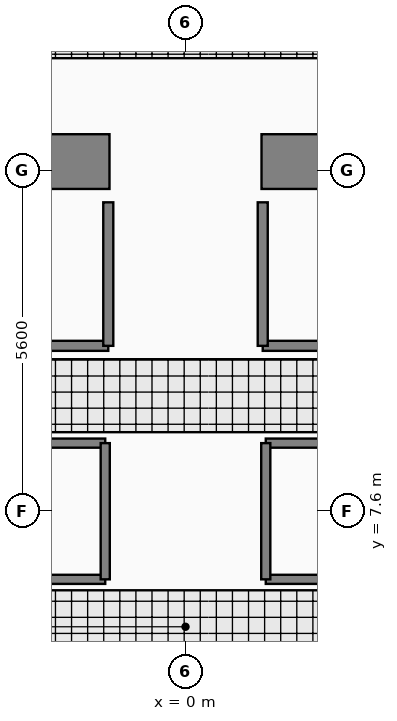
"""IFC4 building model, lengths in metres.
Left out: names, types, materials, properties, quantities, classifications, styles, units other than length and angle.
Written with IfcOpenShell. Run it as: python <this file> out.ifc"""

import sys

from ifc_helpers import new_model, si_unit, direction, frame, frame_2d, origin, place, context, subcontext, project, spatial, rectangle, extrude, element, fill, save


model = new_model("IFC4")
c1 = context("Model", 3, precision=1e-05, world=origin(), true_north=direction((0.0, 1.0)))
c2 = subcontext(c1, "Body", "Model", "MODEL_VIEW")
j1 = project(units=[si_unit("LENGTHUNIT", "METRE"), si_unit("PLANEANGLEUNIT", "RADIAN")], contexts=[c1])
p1 = place(None, origin())
s1 = spatial("IfcSite", under=j1, at=p1, CompositionType="ELEMENT")
p2 = place(p1, origin())
s2 = spatial("IfcBuilding", under=s1, at=p2, CompositionType="ELEMENT")
p3 = place(p2, origin())
s3 = spatial("IfcBuildingStorey", under=s2, at=p3, CompositionType="ELEMENT", Elevation=0.0)
for number, where, z_axis, x_axis in (
    (1, (-8.85, 13.35, 0.0), (0.0, 0.0, 1.0), (1.0, 0.0, 0.0)),
    (2, (1.25, 13.35, 0.0), (0.0, 0.0, 1.0), (1.0, 0.0, 0.0)),
):
    element("IfcWall", number, at=place(p3, frame(where, z_axis=z_axis, x_axis=x_axis)), inside=s3, PredefinedType="SHEAR", context=c2, shape_type="SweptSolid", body=[
        extrude(rectangle(XDim=7.6, YDim=0.9, at=frame_2d((3.8, 0.0))), origin(), (0.0, 0.0, 1.0), 5.75),
    ])
p4 = place(p3, frame((-3.75, 10.32, 0.0), z_axis=(0.0, 0.0, 1.0), x_axis=(1.0, 0.0, 0.0)))
e3 = element("IfcWall", 3, at=p4, inside=s3, PredefinedType="PARTITIONING", context=c2, shape_type="SweptSolid", body=[
    extrude(rectangle(XDim=2.48, YDim=0.165, at=frame_2d((1.24, 0.0))), origin(), (0.0, 0.0, 1.0), 5.75),
])
p5 = place(p4, frame((0.69, 0.0, 0.0)))
e4 = element("IfcOpeningElement", 4, at=p5, cuts=e3, PredefinedType="OPENING", context=c2, shape_type="SweptSolid", body=[
    extrude(rectangle(XDim=1.1, YDim=2.25, at=frame_2d((0.55, 1.125))), frame((0.0, 0.093, 0.0), z_axis=(0.0, -1.0, 0.0), x_axis=(1.0, 0.0, 0.0)), (0.0, 0.0, 1.0), 0.185),
])
p6 = place(p3, frame((1.27, 10.32, 0.0), z_axis=(0.0, 0.0, 1.0), x_axis=(1.0, 0.0, 0.0)))
e5 = element("IfcWall", 5, at=p6, inside=s3, PredefinedType="PARTITIONING", context=c2, shape_type="SweptSolid", body=[
    extrude(rectangle(XDim=2.48, YDim=0.165, at=frame_2d((1.24, 0.0))), origin(), (0.0, 0.0, 1.0), 5.75),
])
p7 = place(p6, frame((0.69, 0.0, 0.0)))
e6 = element("IfcOpeningElement", 6, at=p7, cuts=e5, PredefinedType="OPENING", context=c2, shape_type="SweptSolid", body=[
    extrude(rectangle(XDim=1.1, YDim=2.25, at=frame_2d((0.55, 1.125))), frame((0.0, 0.093, 0.0), z_axis=(0.0, -1.0, 0.0), x_axis=(1.0, 0.0, 0.0)), (0.0, 0.0, 1.0), 0.185),
])
p8 = place(p3, frame((-6.16, 6.48, 0.0), z_axis=(0.0, 0.0, 1.0), x_axis=(1.0, 0.0, 0.0)))
e7 = element("IfcWall", 7, at=p8, inside=s3, PredefinedType="PARTITIONING", context=c2, shape_type="SweptSolid", body=[
    extrude(rectangle(XDim=4.84, YDim=0.15, at=frame_2d((2.42, 0.0))), origin(), (0.0, 0.0, 1.0), 5.75),
])
p9 = place(p8, frame((1.97, 0.0, 0.0)))
e8 = element("IfcOpeningElement", 8, at=p9, cuts=e7, PredefinedType="OPENING", context=c2, shape_type="SweptSolid", body=[
    extrude(rectangle(XDim=0.9, YDim=2.15, at=frame_2d((0.45, 1.075))), frame((0.0, 0.085, 0.0), z_axis=(0.0, -1.0, 0.0), x_axis=(1.0, 0.0, 0.0)), (0.0, 0.0, 1.0), 0.17),
])
p10 = place(p3, frame((1.32, 8.72, 0.0), z_axis=(0.0, 0.0, 1.0), x_axis=(1.0, 0.0, 0.0)))
e9 = element("IfcWall", 9, at=p10, inside=s3, PredefinedType="PARTITIONING", context=c2, shape_type="SweptSolid", body=[
    extrude(rectangle(XDim=2.32, YDim=0.15, at=frame_2d((1.16, 0.0))), origin(), (0.0, 0.0, 1.0), 5.75),
])
p11 = place(p10, frame((0.71, 0.0, 0.0)))
e10 = element("IfcOpeningElement", 10, at=p11, cuts=e9, PredefinedType="OPENING", context=c2, shape_type="SweptSolid", body=[
    extrude(rectangle(XDim=0.9, YDim=2.15, at=frame_2d((0.45, 1.075))), frame((0.0, 0.085, 0.0), z_axis=(0.0, -1.0, 0.0), x_axis=(1.0, 0.0, 0.0)), (0.0, 0.0, 1.0), 0.17),
])
for number, where, z_axis, x_axis in (
    (11, (-1.27, 10.32, 0.0), (0.0, 0.0, 1.0), (0.0, 1.0, 0.0)),
    (12, (1.27, 10.32, 0.0), (0.0, 0.0, 1.0), (0.0, 1.0, 0.0)),
):
    element("IfcWall", number, at=place(p3, frame(where, z_axis=z_axis, x_axis=x_axis)), inside=s3, PredefinedType="PARTITIONING", context=c2, shape_type="SweptSolid", body=[
        extrude(rectangle(XDim=2.36, YDim=0.165, at=frame_2d((1.18, 0.0))), origin(), (0.0, 0.0, 1.0), 5.75),
    ])
p12 = place(p3, frame((-6.16, 8.72, 0.0), z_axis=(0.0, 0.0, 1.0), x_axis=(1.0, 0.0, 0.0)))
e13 = element("IfcWall", 13, at=p12, inside=s3, PredefinedType="PARTITIONING", context=c2, shape_type="SweptSolid", body=[
    extrude(rectangle(XDim=4.84, YDim=0.15, at=frame_2d((2.42, 0.0))), origin(), (0.0, 0.0, 1.0), 5.75),
])
p13 = place(p3, frame((-1.32, 6.48, 0.0), z_axis=(0.0, 0.0, 1.0), x_axis=(0.0, 1.0, 0.0)))
e14 = element("IfcWall", 14, at=p13, inside=s3, PredefinedType="PARTITIONING", context=c2, shape_type="SweptSolid", body=[
    extrude(rectangle(XDim=2.24, YDim=0.15, at=frame_2d((1.12, 0.0))), origin(), (0.0, 0.0, 1.0), 5.75),
])
p14 = place(p3, frame((1.32, 6.48, 0.0), z_axis=(0.0, 0.0, 1.0), x_axis=(1.0, 0.0, 0.0)))
e15 = element("IfcWall", 15, at=p14, inside=s3, PredefinedType="PARTITIONING", context=c2, shape_type="SweptSolid", body=[
    extrude(rectangle(XDim=2.32, YDim=0.15, at=frame_2d((1.16, 0.0))), origin(), (0.0, 0.0, 1.0), 5.75),
])
p15 = place(p3, frame((1.32, 6.48, 0.0), z_axis=(0.0, 0.0, 1.0), x_axis=(0.0, 1.0, 0.0)))
e16 = element("IfcWall", 16, at=p15, inside=s3, PredefinedType="PARTITIONING", context=c2, shape_type="SweptSolid", body=[
    extrude(rectangle(XDim=2.24, YDim=0.15, at=frame_2d((1.12, 0.0))), origin(), (0.0, 0.0, 1.0), 5.75),
])
p16 = place(p5, origin())
e17 = element("IfcDoor", 17, at=p16, inside=s3, OperationType="SLIDING_TO_LEFT", PredefinedType="DOOR", context=c2, shape_type="SweptSolid", body=[
    extrude(rectangle(XDim=1.1, YDim=2.25, at=frame_2d((0.55, 1.125))), frame((0.0, 0.025, 0.0), z_axis=(0.0, -1.0, 0.0), x_axis=(1.0, 0.0, 0.0)), (0.0, 0.0, 1.0), 0.05),
])
fill(e4, e17)
p17 = place(p7, origin())
e18 = element("IfcDoor", 18, at=p17, inside=s3, OperationType="SLIDING_TO_LEFT", PredefinedType="DOOR", context=c2, shape_type="SweptSolid", body=[
    extrude(rectangle(XDim=1.1, YDim=2.25, at=frame_2d((0.55, 1.125))), frame((0.0, 0.025, 0.0), z_axis=(0.0, -1.0, 0.0), x_axis=(1.0, 0.0, 0.0)), (0.0, 0.0, 1.0), 0.05),
])
fill(e6, e18)
p18 = place(p11, origin())
e19 = element("IfcDoor", 19, at=p18, inside=s3, OperationType="SINGLE_SWING_LEFT", PredefinedType="DOOR", context=c2, shape_type="SweptSolid", body=[
    extrude(rectangle(XDim=0.9, YDim=2.15, at=frame_2d((0.45, 1.075))), frame((0.0, 0.025, 0.0), z_axis=(0.0, -1.0, 0.0), x_axis=(1.0, 0.0, 0.0)), (0.0, 0.0, 1.0), 0.05),
])
fill(e10, e19)
save(model, sys.argv[1])
